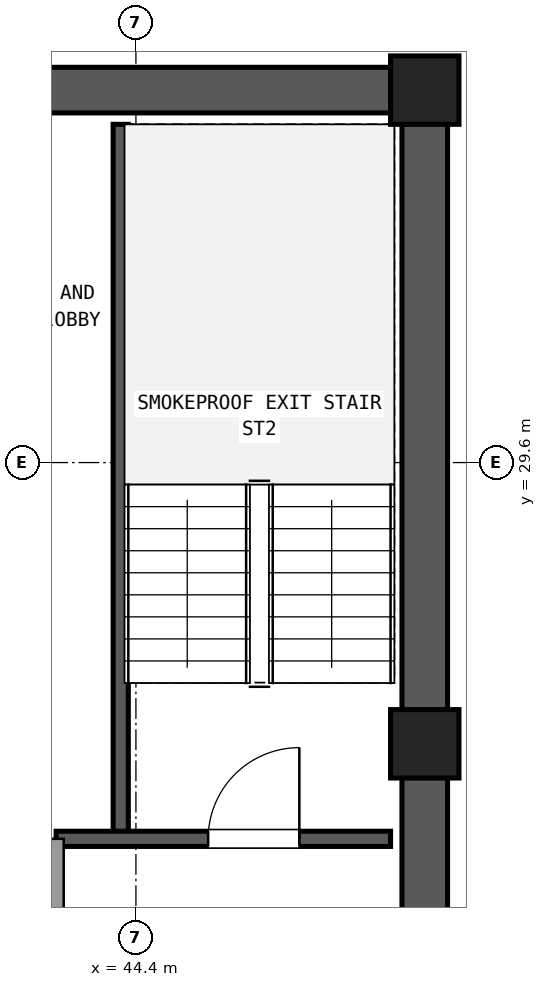
"""IFC4 building model, lengths in metres.
Left out: names, types, materials, properties, quantities, classifications, styles, units other than length and angle.
Written with IfcOpenShell. Run it as: python <this file> out.ifc"""

import sys

from ifc_helpers import new_model, si_unit, direction, frame, frame_2d, origin, origin_2d, place, context, subcontext, project, spatial, rectangle, extrude, element, fill, save


model = new_model("IFC4")
c1 = context("Model", 3, precision=1e-05, world=origin(), true_north=direction((0.0, 1.0)))
c2 = subcontext(c1, "Body", "Model", "MODEL_VIEW")
j1 = project(units=[si_unit("LENGTHUNIT", "METRE"), si_unit("PLANEANGLEUNIT", "RADIAN")], contexts=[c1])
p1 = place(None, origin())
s1 = spatial("IfcSite", under=j1, at=p1, CompositionType="ELEMENT")
p2 = place(p1, origin())
s2 = spatial("IfcBuilding", under=s1, at=p2, CompositionType="ELEMENT")
p3 = place(p2, frame((0.0, 0.0, 214.38)))
s3 = spatial("IfcBuildingStorey", under=s2, at=p3, CompositionType="ELEMENT", Elevation=214.38)
for number, where, z_axis, x_axis in (
    (1, (48.2, 25.9, 0.0), (0.0, 0.0, 1.0), (1.0, 0.0, 0.0)),
    (2, (48.2, 34.5, 0.0), (0.0, 0.0, 1.0), (1.0, 0.0, 0.0)),
):
    element("IfcColumn", number, at=place(p3, frame(where, z_axis=z_axis, x_axis=x_axis)), inside=s3, PredefinedType="COLUMN", context=c2, shape_type="SweptSolid", body=[
        extrude(rectangle(XDim=0.9, YDim=0.9, at=origin_2d()), origin(), (0.0, 0.0, 1.0), 3.6),
    ])
p4 = place(p3, frame((48.2, 17.745, 0.0), z_axis=(0.0, 0.0, 1.0), x_axis=(0.0, 1.0, 0.0)))
e3 = element("IfcWall", 3, at=p4, inside=s3, PredefinedType="SHEAR", context=c2, shape_type="SweptSolid", body=[
    extrude(rectangle(XDim=7.71, YDim=0.6, at=frame_2d((3.855, 0.0))), origin(), (0.0, 0.0, 1.0), 3.32),
])
p5 = place(p4, frame((4.305, 0.0, 0.0)))
e4 = element("IfcOpeningElement", 4, at=p5, cuts=e3, PredefinedType="OPENING", context=c2, shape_type="SweptSolid", body=[
    extrude(rectangle(XDim=1.2, YDim=2.15, at=frame_2d((0.6, 1.075))), frame((0.0, 0.31, 0.0), z_axis=(0.0, -1.0, 0.0), x_axis=(1.0, 0.0, 0.0)), (0.0, 0.0, 1.0), 0.62),
])
p6 = place(p3, frame((48.2, 26.345, 0.0), z_axis=(0.0, 0.0, 1.0), x_axis=(0.0, 1.0, 0.0)))
e5 = element("IfcWall", 5, at=p6, inside=s3, PredefinedType="SHEAR", context=c2, shape_type="SweptSolid", body=[
    extrude(rectangle(XDim=7.71, YDim=0.6, at=frame_2d((3.855, 0.0))), origin(), (0.0, 0.0, 1.0), 3.32),
])
p7 = place(p3, frame((47.755, 34.5, 0.0), z_axis=(0.0, 0.0, 1.0), x_axis=(-1.0, 0.0, 0.0)))
e6 = element("IfcWall", 6, at=p7, inside=s3, PredefinedType="SHEAR", context=c2, shape_type="SweptSolid", body=[
    extrude(rectangle(XDim=10.31, YDim=0.6, at=frame_2d((5.155, 0.0))), origin(), (0.0, 0.0, 1.0), 3.32),
])
p8 = place(p7, frame((4.655, 0.0, 0.0)))
e7 = element("IfcOpeningElement", 7, at=p8, cuts=e6, PredefinedType="OPENING", context=c2, shape_type="SweptSolid", body=[
    extrude(rectangle(XDim=1.6, YDim=2.2, at=frame_2d((0.8, 1.1))), frame((0.0, 0.31, 0.0), z_axis=(0.0, -1.0, 0.0), x_axis=(1.0, 0.0, 0.0)), (0.0, 0.0, 1.0), 0.62),
])
p9 = place(p3, frame((44.2, 24.65, 0.0), z_axis=(0.0, 0.0, 1.0), x_axis=(0.0, 1.0, 0.0)))
e8 = element("IfcWall", 8, at=p9, inside=s3, PredefinedType="SHEAR", context=c2, shape_type="SweptSolid", body=[
    extrude(rectangle(XDim=9.4, YDim=0.2, at=frame_2d((4.7, 0.0))), origin(), (0.0, 0.0, 1.0), 3.32),
])
p10 = place(p3, frame((43.35, 24.65, 0.0), z_axis=(0.0, 0.0, 1.0), x_axis=(1.0, 0.0, 0.0)))
e9 = element("IfcWall", 9, at=p10, inside=s3, PredefinedType="SHEAR", context=c2, shape_type="SweptSolid", body=[
    extrude(rectangle(XDim=4.4, YDim=0.2, at=frame_2d((2.2, 0.0))), origin(), (0.0, 0.0, 1.0), 3.32),
])
p11 = place(p10, frame((2.0, 0.0, 0.0)))
e10 = element("IfcOpeningElement", 10, at=p11, cuts=e9, PredefinedType="OPENING", context=c2, shape_type="SweptSolid", body=[
    extrude(rectangle(XDim=1.2, YDim=2.15, at=frame_2d((0.6, 1.075))), frame((0.0, 0.11, 0.0), z_axis=(0.0, -1.0, 0.0), x_axis=(1.0, 0.0, 0.0)), (0.0, 0.0, 1.0), 0.22),
])
p12 = place(p3, frame((43.35, 17.75, 0.0), z_axis=(0.0, 0.0, 1.0), x_axis=(0.0, 1.0, 0.0)))
e11 = element("IfcWall", 11, at=p12, inside=s3, PredefinedType="SOLIDWALL", context=c2, shape_type="SweptSolid", body=[
    extrude(rectangle(XDim=6.9, YDim=0.2, at=frame_2d((3.45, 0.0))), origin(), (0.0, 0.0, 1.0), 2.61),
])
p13 = place(p12, frame((4.15, 0.0, 0.0)))
e12 = element("IfcOpeningElement", 12, at=p13, cuts=e11, PredefinedType="OPENING", context=c2, shape_type="SweptSolid", body=[
    extrude(rectangle(XDim=1.2, YDim=2.15, at=frame_2d((0.6, 1.075))), frame((0.0, 0.11, 0.0), z_axis=(0.0, -1.0, 0.0), x_axis=(1.0, 0.0, 0.0)), (0.0, 0.0, 1.0), 0.22),
])
p14 = place(p11, origin())
e13 = element("IfcDoor", 13, at=p14, inside=s3, OperationType="SINGLE_SWING_RIGHT", PredefinedType="DOOR", context=c2, shape_type="SweptSolid", body=[
    extrude(rectangle(XDim=1.2, YDim=2.15, at=frame_2d((0.6, 1.075))), frame((0.0, 0.025, 0.0), z_axis=(0.0, -1.0, 0.0), x_axis=(1.0, 0.0, 0.0)), (0.0, 0.0, 1.0), 0.05),
])
fill(e10, e13)
save(model, sys.argv[1])
